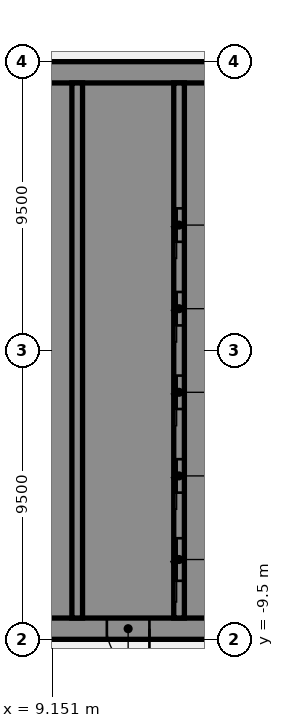
"""IFC4 building model, lengths in metres.
Left out: names, types, materials, properties, quantities, classifications, styles, units other than length and angle.
Written with IfcOpenShell. Run it as: python <this file> out.ifc"""

import sys

from ifc_helpers import new_model, si_unit, direction, frame, frame_2d, origin, place, context, subcontext, project, spatial, polyline, rectangle, outline, extrude, element, fill, save


model = new_model("IFC4")
c1 = context("Model", 3, precision=1e-05, world=origin(), true_north=direction((0.0, 1.0)))
c2 = subcontext(c1, "Body", "Model", "MODEL_VIEW")
j1 = project(units=[si_unit("LENGTHUNIT", "METRE"), si_unit("PLANEANGLEUNIT", "RADIAN")], contexts=[c1])
p1 = place(None, origin())
s1 = spatial("IfcSite", under=j1, at=p1, CompositionType="ELEMENT")
p2 = place(p1, origin())
s2 = spatial("IfcBuilding", under=s1, at=p2, CompositionType="ELEMENT")
p3 = place(p2, frame((0.0, 0.0, 15.0)))
s3 = spatial("IfcBuildingStorey", under=s2, at=p3, CompositionType="ELEMENT", Elevation=15.0)
p4 = place(p3, frame((16.5, -9.15, 0.0), z_axis=(0.0, 0.0, 1.0), x_axis=(-1.0, 0.0, 0.0)))
e1 = element("IfcWall", 1, at=p4, inside=s3, PredefinedType="SHEAR", context=c2, shape_type="SweptSolid", body=[
    extrude(rectangle(XDim=13.0, YDim=0.7, at=frame_2d((6.5, 0.0))), origin(), (0.0, 0.0, 1.0), 4.5),
])
p5 = place(p4, frame((4.15, 0.0, 0.0)))
e2 = element("IfcOpeningElement", 2, at=p5, cuts=e1, PredefinedType="OPENING", context=c2, shape_type="SweptSolid", body=[
    extrude(rectangle(XDim=1.4, YDim=2.1, at=frame_2d((0.7, 1.05))), frame((0.0, 0.36, 0.0), z_axis=(0.0, -1.0, 0.0), x_axis=(1.0, 0.0, 0.0)), (0.0, 0.0, 1.0), 0.72),
])
p6 = place(p4, frame((10.125, 0.0, 0.0)))
e3 = element("IfcOpeningElement", 3, at=p6, cuts=e1, PredefinedType="OPENING", context=c2, shape_type="SweptSolid", body=[
    extrude(rectangle(XDim=1.4, YDim=2.1, at=frame_2d((0.7, 1.05))), frame((0.0, 0.36, 0.0), z_axis=(0.0, -1.0, 0.0), x_axis=(1.0, 0.0, 0.0)), (0.0, 0.0, 1.0), 0.72),
])
p7 = place(p3, origin())
e4 = element("IfcWall", 4, at=p7, inside=s3, PredefinedType="SHEAR", context=c2, shape_type="SweptSolid", body=[
    extrude(outline(polyline([(13.5, -8.8), (15.8, -8.8), (16.5, -8.8), (16.5, 8.8), (15.8, 8.8), (13.5, 8.8), (13.5, 8.125), (15.8, 8.125), (15.8, 5.625), (13.5, 5.625), (13.5, 5.375), (15.8, 5.375), (15.8, 2.875), (13.5, 2.875), (13.5, 2.625), (15.8, 2.625), (15.8, 0.125), (13.5, 0.125), (13.5, -0.125), (15.8, -0.125), (15.8, -2.625), (13.5, -2.625), (13.5, -2.875), (15.8, -2.875), (15.8, -5.375), (13.5, -5.375), (13.5, -5.625), (15.8, -5.625), (15.8, -8.125), (13.5, -8.125), (13.5, -8.8)])), origin(), (0.0, 0.0, 1.0), 4.5),
])
p8 = place(p3, frame((16.5, 9.15, 0.0), z_axis=(0.0, 0.0, 1.0), x_axis=(-1.0, 0.0, 0.0)))
e5 = element("IfcWall", 5, at=p8, inside=s3, PredefinedType="SHEAR", context=c2, shape_type="SweptSolid", body=[
    extrude(rectangle(XDim=13.0, YDim=0.7, at=frame_2d((6.5, 0.0))), origin(), (0.0, 0.0, 1.0), 4.5),
])
p9 = place(p3, origin())
e6 = element("IfcWall", 6, at=p9, inside=s3, PredefinedType="SHEAR", context=c2, shape_type="SweptSolid", body=[
    extrude(outline(polyline([(9.8, -5.375), (7.5, -5.375), (7.5, -2.875), (9.8, -2.875), (9.8, -2.625), (7.5, -2.625), (7.5, -0.125), (9.8, -0.125), (9.8, 0.125), (7.5, 0.125), (7.5, 2.625), (9.8, 2.625), (9.8, 2.875), (7.5, 2.875), (7.5, 5.375), (9.8, 5.375), (9.8, 5.625), (7.5, 5.625), (7.5, 8.125), (9.8, 8.125), (9.8, 8.8), (7.5, 8.8), (7.15, 8.8), (7.15, -5.625), (7.5, -5.625), (9.8, -5.625), (9.8, -5.375)])), origin(), (0.0, 0.0, 1.0), 4.5),
])
p10 = place(p3, origin())
e7 = element("IfcWall", 7, at=p10, inside=s3, PredefinedType="SHEAR", context=c2, shape_type="SweptSolid", body=[
    extrude(outline(polyline([(7.5, -8.125), (7.5, -8.8), (9.8, -8.8), (9.8, -8.125), (9.8, -5.625), (9.55, -5.625), (9.55, -8.125), (7.5, -8.125)])), origin(), (0.0, 0.0, 1.0), 4.5),
])
p11 = place(p3, frame((13.325, -8.8, 0.0), z_axis=(0.0, 0.0, 1.0), x_axis=(0.0, 1.0, 0.0)))
e8 = element("IfcWall", 8, at=p11, inside=s3, PredefinedType="SHEAR", context=c2, shape_type="SweptSolid", body=[
    extrude(rectangle(XDim=17.6, YDim=0.35, at=frame_2d((8.8, 0.0))), origin(), (0.0, 0.0, 1.0), 4.5),
])
p12 = place(p11, frame((1.225, 0.0, 0.0)))
e9 = element("IfcOpeningElement", 9, at=p12, cuts=e8, PredefinedType="OPENING", context=c2, shape_type="SweptSolid", body=[
    extrude(rectangle(XDim=1.4, YDim=2.1, at=frame_2d((0.7, 1.05))), frame((0.0, 0.185, 0.0), z_axis=(0.0, -1.0, 0.0), x_axis=(1.0, 0.0, 0.0)), (0.0, 0.0, 1.0), 0.37),
])
p13 = place(p11, frame((4.125, 0.0, 0.0)))
e10 = element("IfcOpeningElement", 10, at=p13, cuts=e8, PredefinedType="OPENING", context=c2, shape_type="SweptSolid", body=[
    extrude(rectangle(XDim=1.1, YDim=2.1, at=frame_2d((0.55, 1.05))), frame((0.0, 0.185, 0.0), z_axis=(0.0, -1.0, 0.0), x_axis=(1.0, 0.0, 0.0)), (0.0, 0.0, 1.0), 0.37),
])
p14 = place(p11, frame((6.875, 0.0, 0.0)))
e11 = element("IfcOpeningElement", 11, at=p14, cuts=e8, PredefinedType="OPENING", context=c2, shape_type="SweptSolid", body=[
    extrude(rectangle(XDim=1.1, YDim=2.1, at=frame_2d((0.55, 1.05))), frame((0.0, 0.185, 0.0), z_axis=(0.0, -1.0, 0.0), x_axis=(1.0, 0.0, 0.0)), (0.0, 0.0, 1.0), 0.37),
])
p15 = place(p11, frame((9.625, 0.0, 0.0)))
e12 = element("IfcOpeningElement", 12, at=p15, cuts=e8, PredefinedType="OPENING", context=c2, shape_type="SweptSolid", body=[
    extrude(rectangle(XDim=1.1, YDim=2.1, at=frame_2d((0.55, 1.05))), frame((0.0, 0.185, 0.0), z_axis=(0.0, -1.0, 0.0), x_axis=(1.0, 0.0, 0.0)), (0.0, 0.0, 1.0), 0.37),
])
p16 = place(p11, frame((12.375, 0.0, 0.0)))
e13 = element("IfcOpeningElement", 13, at=p16, cuts=e8, PredefinedType="OPENING", context=c2, shape_type="SweptSolid", body=[
    extrude(rectangle(XDim=1.1, YDim=2.1, at=frame_2d((0.55, 1.05))), frame((0.0, 0.185, 0.0), z_axis=(0.0, -1.0, 0.0), x_axis=(1.0, 0.0, 0.0)), (0.0, 0.0, 1.0), 0.37),
])
p17 = place(p3, frame((9.975, -8.8, 0.0), z_axis=(0.0, 0.0, 1.0), x_axis=(0.0, 1.0, 0.0)))
e14 = element("IfcWall", 14, at=p17, inside=s3, PredefinedType="SHEAR", context=c2, shape_type="SweptSolid", body=[
    extrude(rectangle(XDim=17.6, YDim=0.35, at=frame_2d((8.8, 0.0))), origin(), (0.0, 0.0, 1.0), 4.5),
])
p18 = place(p5, origin())
e15 = element("IfcDoor", 15, at=p18, inside=s3, OperationType="SINGLE_SWING_LEFT", PredefinedType="DOOR", context=c2, shape_type="SweptSolid", body=[
    extrude(rectangle(XDim=1.4, YDim=2.1, at=frame_2d((0.7, 1.05))), frame((0.0, 0.025, 0.0), z_axis=(0.0, -1.0, 0.0), x_axis=(1.0, 0.0, 0.0)), (0.0, 0.0, 1.0), 0.05),
])
fill(e2, e15)
p19 = place(p12, origin())
e16 = element("IfcDoor", 16, at=p19, inside=s3, OperationType="SLIDING_TO_LEFT", PredefinedType="DOOR", context=c2, shape_type="SweptSolid", body=[
    extrude(rectangle(XDim=1.4, YDim=2.1, at=frame_2d((0.7, 1.05))), frame((0.0, 0.025, 0.0), z_axis=(0.0, -1.0, 0.0), x_axis=(1.0, 0.0, 0.0)), (0.0, 0.0, 1.0), 0.05),
])
fill(e9, e16)
p20 = place(p13, origin())
e17 = element("IfcDoor", 17, at=p20, inside=s3, OperationType="SLIDING_TO_LEFT", PredefinedType="DOOR", context=c2, shape_type="SweptSolid", body=[
    extrude(rectangle(XDim=1.1, YDim=2.1, at=frame_2d((0.55, 1.05))), frame((0.0, 0.025, 0.0), z_axis=(0.0, -1.0, 0.0), x_axis=(1.0, 0.0, 0.0)), (0.0, 0.0, 1.0), 0.05),
])
fill(e10, e17)
p21 = place(p14, origin())
e18 = element("IfcDoor", 18, at=p21, inside=s3, OperationType="SLIDING_TO_LEFT", PredefinedType="DOOR", context=c2, shape_type="SweptSolid", body=[
    extrude(rectangle(XDim=1.1, YDim=2.1, at=frame_2d((0.55, 1.05))), frame((0.0, 0.025, 0.0), z_axis=(0.0, -1.0, 0.0), x_axis=(1.0, 0.0, 0.0)), (0.0, 0.0, 1.0), 0.05),
])
fill(e11, e18)
p22 = place(p15, origin())
e19 = element("IfcDoor", 19, at=p22, inside=s3, OperationType="SLIDING_TO_LEFT", PredefinedType="DOOR", context=c2, shape_type="SweptSolid", body=[
    extrude(rectangle(XDim=1.1, YDim=2.1, at=frame_2d((0.55, 1.05))), frame((0.0, 0.025, 0.0), z_axis=(0.0, -1.0, 0.0), x_axis=(1.0, 0.0, 0.0)), (0.0, 0.0, 1.0), 0.05),
])
fill(e12, e19)
p23 = place(p16, origin())
e20 = element("IfcDoor", 20, at=p23, inside=s3, OperationType="SLIDING_TO_LEFT", PredefinedType="DOOR", context=c2, shape_type="SweptSolid", body=[
    extrude(rectangle(XDim=1.1, YDim=2.1, at=frame_2d((0.55, 1.05))), frame((0.0, 0.025, 0.0), z_axis=(0.0, -1.0, 0.0), x_axis=(1.0, 0.0, 0.0)), (0.0, 0.0, 1.0), 0.05),
])
fill(e13, e20)
save(model, sys.argv[1])
